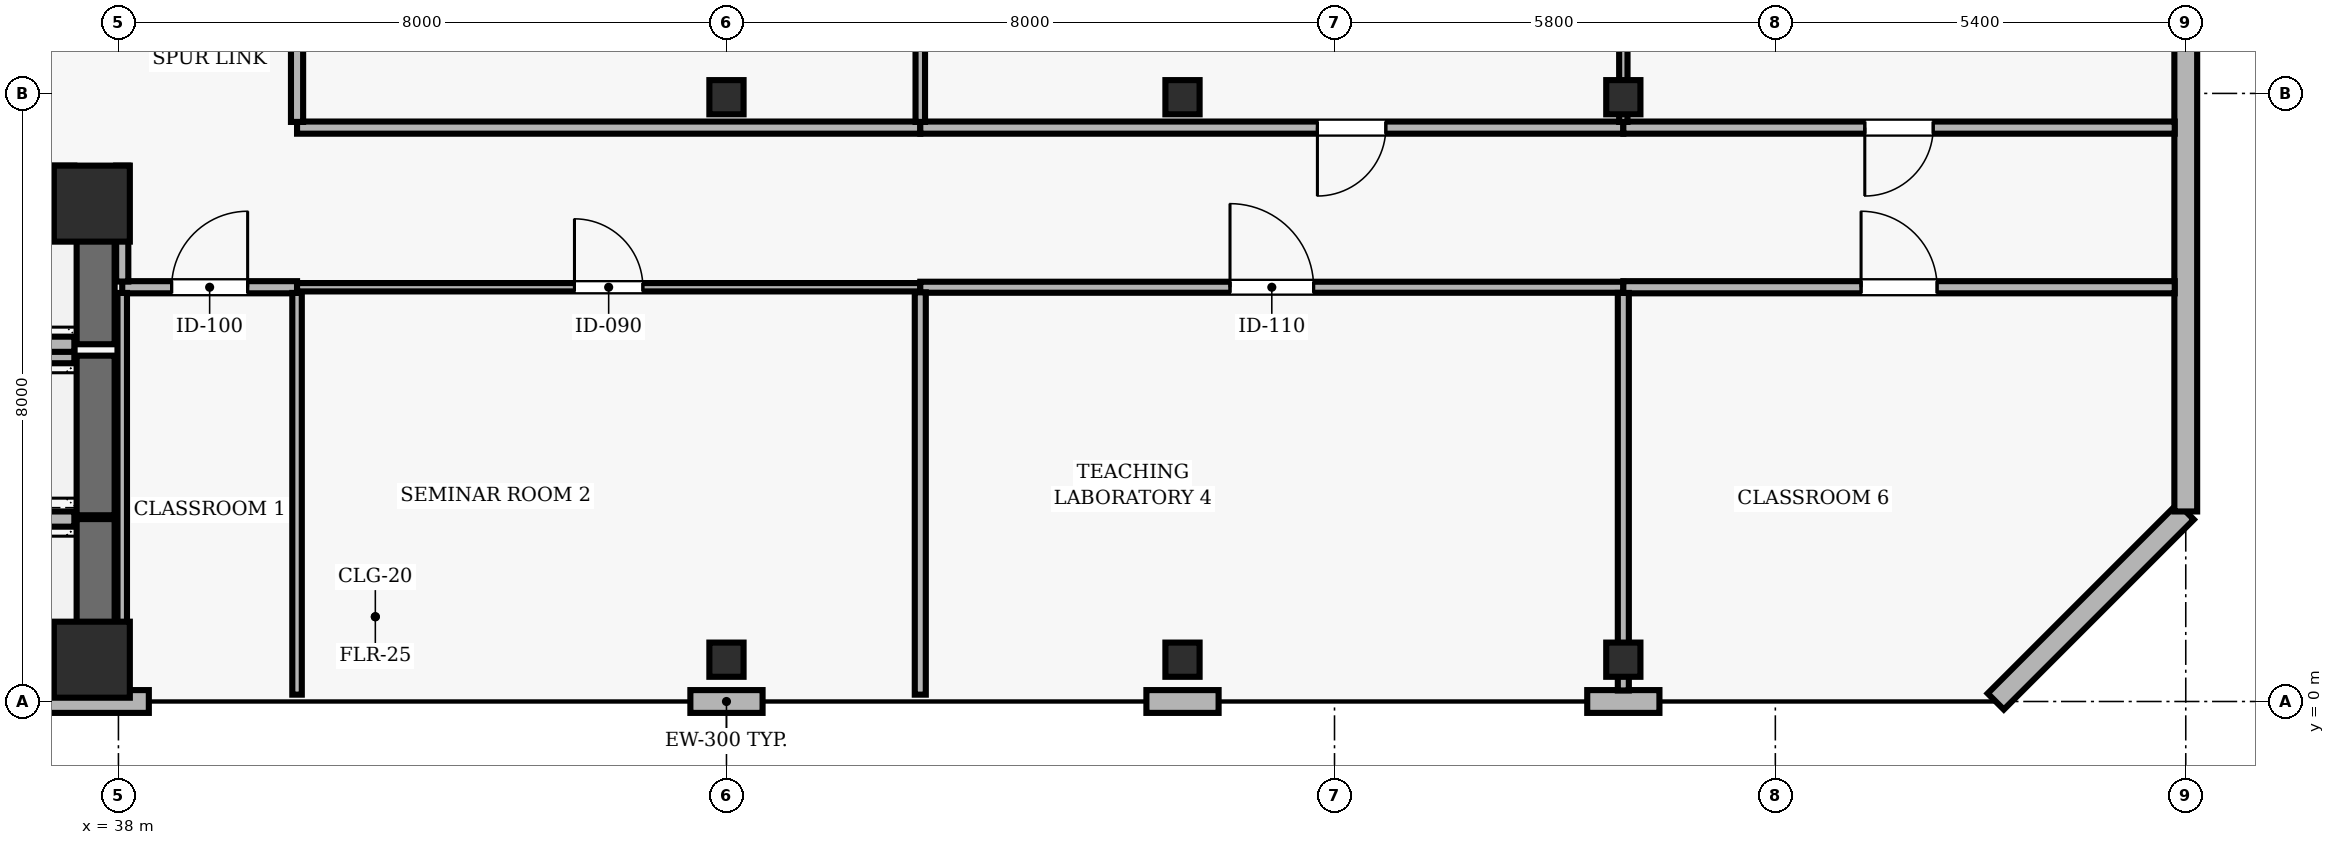
"""IFC4 building model, lengths in metres.
Left out: names, types, materials, properties, quantities, classifications, styles, units other than length and angle.
Written with IfcOpenShell. Run it as: python <this file> out.ifc"""

import sys

from ifc_helpers import new_model, si_unit, direction, frame, frame_2d, origin, origin_2d, place, context, subcontext, project, spatial, rectangle, hollow_rectangle, extrude, element, fill, save


model = new_model("IFC4")
c1 = context("Model", 3, precision=1e-05, world=origin(), true_north=direction((0.0, 1.0)))
c2 = subcontext(c1, "Body", "Model", "MODEL_VIEW")
j1 = project(units=[si_unit("LENGTHUNIT", "METRE"), si_unit("PLANEANGLEUNIT", "RADIAN")], contexts=[c1])
p1 = place(None, origin())
s1 = spatial("IfcSite", under=j1, at=p1, CompositionType="ELEMENT")
p2 = place(p1, origin())
s2 = spatial("IfcBuilding", under=s1, at=p2, CompositionType="ELEMENT")
p3 = place(p2, frame((0.0, 0.0, 183.6)))
s3 = spatial("IfcBuildingStorey", under=s2, at=p3, CompositionType="ELEMENT", Elevation=183.6)
for number, where, z_axis, x_axis in (
    (1, (37.65, 0.55, 0.0), (0.0, 0.0, 1.0), (1.0, 0.0, 0.0)),
    (2, (37.65, 6.55, 0.0), (0.0, 0.0, 1.0), (1.0, 0.0, 0.0)),
):
    element("IfcColumn", number, at=place(p3, frame(where, z_axis=z_axis, x_axis=x_axis)), inside=s3, PredefinedType="COLUMN", context=c2, shape_type="SweptSolid", body=[
        extrude(rectangle(XDim=1.0, YDim=1.0, at=origin_2d()), origin(), (0.0, 0.0, 1.0), 3.9),
    ])
for number, where, z_axis, x_axis in (
    (3, (46.0, 0.55, 0.0), (0.0, 0.0, 1.0), (1.0, 0.0, 0.0)),
    (4, (46.0, 7.95, 0.0), (0.0, 0.0, 1.0), (1.0, 0.0, 0.0)),
    (5, (52.0, 0.55, 0.0), (0.0, 0.0, 1.0), (1.0, 0.0, 0.0)),
    (6, (52.0, 7.95, 0.0), (0.0, 0.0, 1.0), (1.0, 0.0, 0.0)),
    (7, (57.8, 0.55, 0.0), (0.0, 0.0, 1.0), (1.0, 0.0, 0.0)),
    (8, (57.8, 7.95, 0.0), (0.0, 0.0, 1.0), (1.0, 0.0, 0.0)),
):
    element("IfcColumn", number, at=place(p3, frame(where, z_axis=z_axis, x_axis=x_axis)), inside=s3, PredefinedType="COLUMN", context=c2, shape_type="SweptSolid", body=[
        extrude(hollow_rectangle(XDim=0.45, YDim=0.45, WallThickness=0.02, at=origin_2d()), origin(), (0.0, 0.0, 1.0), 3.9),
    ])
p4 = place(p3, frame((31.0, 0.0, 0.0), z_axis=(0.0, 0.0, 1.0), x_axis=(1.0, 0.0, 0.0)))
e9 = element("IfcWall", 9, at=p4, inside=s3, PredefinedType="SOLIDWALL", context=c2, shape_type="SweptSolid", body=[
    extrude(rectangle(XDim=7.4, YDim=0.3, at=frame_2d((3.7, 0.0))), origin(), (0.0, 0.0, 1.0), 3.69),
])
for number, where, z_axis, x_axis in (
    (10, (45.525, 0.0, 0.0), (0.0, 0.0, 1.0), (1.0, 0.0, 0.0)),
    (11, (51.525, 0.0, 0.0), (0.0, 0.0, 1.0), (1.0, 0.0, 0.0)),
):
    element("IfcWall", number, at=place(p3, frame(where, z_axis=z_axis, x_axis=x_axis)), inside=s3, PredefinedType="SOLIDWALL", context=c2, shape_type="SweptSolid", body=[
        extrude(rectangle(XDim=0.95, YDim=0.3, at=frame_2d((0.475, 0.0))), origin(), (0.0, 0.0, 1.0), 3.69),
    ])
p5 = place(p3, frame((57.325, 0.0, 0.0), z_axis=(0.0, 0.0, 1.0), x_axis=(1.0, 0.0, 0.0)))
e12 = element("IfcWall", 12, at=p5, inside=s3, PredefinedType="SOLIDWALL", context=c2, shape_type="SweptSolid", body=[
    extrude(rectangle(XDim=0.95, YDim=0.3, at=frame_2d((0.475, 0.0))), origin(), (0.0, 0.0, 1.0), 3.69),
])
p6 = place(p3, frame((62.7, 0.0, 0.0), z_axis=(0.0, 0.0, 1.0), x_axis=(0.707106781187, 0.707106781187, 0.0)))
e13 = element("IfcWall", 13, at=p6, inside=s3, PredefinedType="SOLIDWALL", context=c2, shape_type="SweptSolid", body=[
    extrude(rectangle(XDim=3.536, YDim=0.3, at=frame_2d((1.768, 0.0))), origin(), (0.0, 0.0, 1.0), 3.69),
])
p7 = place(p3, frame((65.2, 2.5, 0.0), z_axis=(0.0, 0.0, 1.0), x_axis=(0.0, 1.0, 0.0)))
e14 = element("IfcWall", 14, at=p7, inside=s3, PredefinedType="SOLIDWALL", context=c2, shape_type="SweptSolid", body=[
    extrude(rectangle(XDim=11.0, YDim=0.3, at=frame_2d((5.5, 0.0))), origin(), (0.0, 0.0, 1.0), 3.69),
])
p8 = place(p7, frame((7.05, 0.0, 0.9)))
e15 = element("IfcOpeningElement", 15, at=p8, cuts=e14, PredefinedType="OPENING", context=c2, shape_type="SweptSolid", body=[
    extrude(rectangle(XDim=2.4, YDim=2.2, at=frame_2d((1.2, 1.1))), frame((0.0, 0.16, 0.0), z_axis=(0.0, -1.0, 0.0), x_axis=(1.0, 0.0, 0.0)), (0.0, 0.0, 1.0), 0.32),
])
p9 = place(p3, frame((37.7, 0.3, 0.0), z_axis=(0.0, 0.0, 1.0), x_axis=(0.0, 1.0, 0.0)))
e16 = element("IfcWall", 16, at=p9, inside=s3, PredefinedType="SHEAR", context=c2, shape_type="SweptSolid", body=[
    extrude(rectangle(XDim=2.1, YDim=0.5, at=frame_2d((1.05, 0.0))), origin(), (0.0, 0.0, 1.0), 3.69),
])
for number, where, z_axis, x_axis in (
    (17, (35.28, 0.3, 0.0), (0.0, 0.0, 1.0), (1.0, 0.0, 0.0)),
    (18, (37.42, 2.4, 0.0), (0.0, 0.0, 1.0), (-1.0, 0.0, 0.0)),
):
    element("IfcWall", number, at=place(p3, frame(where, z_axis=z_axis, x_axis=x_axis)), inside=s3, PredefinedType="SOLIDWALL", context=c2, shape_type="SweptSolid", body=[
        extrude(rectangle(XDim=2.14, YDim=0.2, at=frame_2d((1.07, 0.0))), origin(), (0.0, 0.0, 1.0), 3.69),
    ])
p10 = place(p3, frame((37.7, 2.45, 0.0), z_axis=(0.0, 0.0, 1.0), x_axis=(0.0, 1.0, 0.0)))
e19 = element("IfcWall", 19, at=p10, inside=s3, PredefinedType="SHEAR", context=c2, shape_type="SweptSolid", body=[
    extrude(rectangle(XDim=2.1, YDim=0.5, at=frame_2d((1.05, 0.0))), origin(), (0.0, 0.0, 1.0), 3.69),
])
p11 = place(p3, frame((37.42, 4.55, 0.0), z_axis=(0.0, 0.0, 1.0), x_axis=(-1.0, 0.0, 0.0)))
e20 = element("IfcWall", 20, at=p11, inside=s3, PredefinedType="SOLIDWALL", context=c2, shape_type="SweptSolid", body=[
    extrude(rectangle(XDim=2.14, YDim=0.2, at=frame_2d((1.07, 0.0))), origin(), (0.0, 0.0, 1.0), 3.69),
])
p12 = place(p3, frame((37.7, 4.7, 0.0), z_axis=(0.0, 0.0, 1.0), x_axis=(0.0, 1.0, 0.0)))
e21 = element("IfcWall", 21, at=p12, inside=s3, PredefinedType="SHEAR", context=c2, shape_type="SweptSolid", body=[
    extrude(rectangle(XDim=2.25, YDim=0.5, at=frame_2d((1.125, 0.0))), origin(), (0.0, 0.0, 1.0), 3.69),
])
for number, where, z_axis, x_axis in (
    (22, (35.28, 4.7, 0.0), (0.0, 0.0, 1.0), (1.0, 0.0, 0.0)),
    (23, (37.42, 6.95, 0.0), (0.0, 0.0, 1.0), (-1.0, 0.0, 0.0)),
):
    element("IfcWall", number, at=place(p3, frame(where, z_axis=z_axis, x_axis=x_axis)), inside=s3, PredefinedType="SOLIDWALL", context=c2, shape_type="SweptSolid", body=[
        extrude(rectangle(XDim=2.14, YDim=0.2, at=frame_2d((1.07, 0.0))), origin(), (0.0, 0.0, 1.0), 3.69),
    ])
p13 = place(p3, frame((38.05, 5.45, 0.0), z_axis=(0.0, 0.0, 1.0), x_axis=(1.0, 0.0, 0.0)))
e24 = element("IfcWall", 24, at=p13, inside=s3, PredefinedType="PARTITIONING", context=c2, shape_type="SweptSolid", body=[
    extrude(rectangle(XDim=2.3, YDim=0.16, at=frame_2d((1.15, 0.0))), origin(), (0.0, 0.0, 1.0), 3.343),
])
p14 = place(p13, frame((0.65, 0.0, 0.0)))
e25 = element("IfcOpeningElement", 25, at=p14, cuts=e24, PredefinedType="OPENING", context=c2, shape_type="SweptSolid", body=[
    extrude(rectangle(XDim=1.0, YDim=2.1, at=frame_2d((0.5, 1.05))), frame((0.0, 0.09, 0.0), z_axis=(0.0, -1.0, 0.0), x_axis=(1.0, 0.0, 0.0)), (0.0, 0.0, 1.0), 0.18),
])
p15 = place(p3, frame((40.35, 5.45, 0.0), z_axis=(0.0, 0.0, 1.0), x_axis=(1.0, 0.0, 0.0)))
e26 = element("IfcWall", 26, at=p15, inside=s3, PredefinedType="MOVABLE", context=c2, shape_type="SweptSolid", body=[
    extrude(rectangle(XDim=8.2, YDim=0.11, at=frame_2d((4.1, 0.0))), origin(), (0.0, 0.0, 1.0), 3.343),
])
p16 = place(p15, frame((3.65, 0.0, 0.0)))
e27 = element("IfcOpeningElement", 27, at=p16, cuts=e26, PredefinedType="OPENING", context=c2, shape_type="SweptSolid", body=[
    extrude(rectangle(XDim=0.9, YDim=2.1, at=frame_2d((0.45, 1.05))), frame((0.0, 0.065, 0.0), z_axis=(0.0, -1.0, 0.0), x_axis=(1.0, 0.0, 0.0)), (0.0, 0.0, 1.0), 0.13),
])
p17 = place(p3, frame((48.55, 5.45, 0.0), z_axis=(0.0, 0.0, 1.0), x_axis=(1.0, 0.0, 0.0)))
e28 = element("IfcWall", 28, at=p17, inside=s3, PredefinedType="PARTITIONING", context=c2, shape_type="SweptSolid", body=[
    extrude(rectangle(XDim=9.25, YDim=0.145, at=frame_2d((4.625, 0.0))), origin(), (0.0, 0.0, 1.0), 3.343),
])
p18 = place(p17, frame((4.075, 0.0, 0.0)))
e29 = element("IfcOpeningElement", 29, at=p18, cuts=e28, PredefinedType="OPENING", context=c2, shape_type="SweptSolid", body=[
    extrude(rectangle(XDim=1.1, YDim=2.15, at=frame_2d((0.55, 1.075))), frame((0.0, 0.083, 0.0), z_axis=(0.0, -1.0, 0.0), x_axis=(1.0, 0.0, 0.0)), (0.0, 0.0, 1.0), 0.165),
])
p19 = place(p3, frame((48.55, 7.55, 0.0), z_axis=(0.0, 0.0, 1.0), x_axis=(-1.0, 0.0, 0.0)))
e30 = element("IfcWall", 30, at=p19, inside=s3, PredefinedType="PARTITIONING", context=c2, shape_type="SweptSolid", body=[
    extrude(rectangle(XDim=8.2, YDim=0.16, at=frame_2d((4.1, 0.0))), origin(), (0.0, 0.0, 1.0), 3.139),
])
p20 = place(p3, frame((57.8, 5.45, 0.0), z_axis=(0.0, 0.0, 1.0), x_axis=(1.0, 0.0, 0.0)))
e31 = element("IfcWall", 31, at=p20, inside=s3, PredefinedType="PARTITIONING", context=c2, shape_type="SweptSolid", body=[
    extrude(rectangle(XDim=7.255, YDim=0.16, at=frame_2d((3.627, 0.0))), origin(), (0.0, 0.0, 1.0), 3.69),
])
p21 = place(p20, frame((3.128, 0.0, 0.0)))
e32 = element("IfcOpeningElement", 32, at=p21, cuts=e31, PredefinedType="OPENING", context=c2, shape_type="SweptSolid", body=[
    extrude(rectangle(XDim=1.0, YDim=2.1, at=frame_2d((0.5, 1.05))), frame((0.0, 0.09, 0.0), z_axis=(0.0, -1.0, 0.0), x_axis=(1.0, 0.0, 0.0)), (0.0, 0.0, 1.0), 0.18),
])
p22 = place(p3, frame((57.8, 7.55, 0.0), z_axis=(0.0, 0.0, 1.0), x_axis=(-1.0, 0.0, 0.0)))
e33 = element("IfcWall", 33, at=p22, inside=s3, PredefinedType="PARTITIONING", context=c2, shape_type="SweptSolid", body=[
    extrude(rectangle(XDim=9.25, YDim=0.16, at=frame_2d((4.625, 0.0))), origin(), (0.0, 0.0, 1.0), 3.139),
])
p23 = place(p22, frame((3.125, 0.0, 0.0)))
e34 = element("IfcOpeningElement", 34, at=p23, cuts=e33, PredefinedType="OPENING", context=c2, shape_type="SweptSolid", body=[
    extrude(rectangle(XDim=0.9, YDim=2.1, at=frame_2d((0.45, 1.05))), frame((0.0, 0.09, 0.0), z_axis=(0.0, -1.0, 0.0), x_axis=(1.0, 0.0, 0.0)), (0.0, 0.0, 1.0), 0.18),
])
p24 = place(p3, frame((65.055, 7.55, 0.0), z_axis=(0.0, 0.0, 1.0), x_axis=(-1.0, 0.0, 0.0)))
e35 = element("IfcWall", 35, at=p24, inside=s3, PredefinedType="PARTITIONING", context=c2, shape_type="SweptSolid", body=[
    extrude(rectangle(XDim=7.255, YDim=0.16, at=frame_2d((3.627, 0.0))), origin(), (0.0, 0.0, 1.0), 3.69),
])
p25 = place(p24, frame((3.178, 0.0, 0.0)))
e36 = element("IfcOpeningElement", 36, at=p25, cuts=e35, PredefinedType="OPENING", context=c2, shape_type="SweptSolid", body=[
    extrude(rectangle(XDim=0.9, YDim=2.1, at=frame_2d((0.45, 1.05))), frame((0.0, 0.09, 0.0), z_axis=(0.0, -1.0, 0.0), x_axis=(1.0, 0.0, 0.0)), (0.0, 0.0, 1.0), 0.18),
])
p26 = place(p3, frame((38.05, 5.375, 0.0), z_axis=(0.0, 0.0, 1.0), x_axis=(0.0, -1.0, 0.0)))
e37 = element("IfcWall", 37, at=p26, inside=s3, PredefinedType="PARTITIONING", context=c2, shape_type="SweptSolid", body=[
    extrude(rectangle(XDim=5.23, YDim=0.125, at=frame_2d((2.615, 0.0))), origin(), (0.0, 0.0, 1.0), 3.139),
])
p27 = place(p3, frame((38.05, 7.05, 0.0), z_axis=(0.0, 0.0, 1.0), x_axis=(0.0, -1.0, 0.0)))
e38 = element("IfcWall", 38, at=p27, inside=s3, PredefinedType="PARTITIONING", context=c2, shape_type="SweptSolid", body=[
    extrude(rectangle(XDim=1.525, YDim=0.16, at=frame_2d((0.763, 0.0))), origin(), (0.0, 0.0, 1.0), 3.139),
])
p28 = place(p3, frame((40.35, 0.09, 0.0), z_axis=(0.0, 0.0, 1.0), x_axis=(0.0, 1.0, 0.0)))
e39 = element("IfcWall", 39, at=p28, inside=s3, PredefinedType="PARTITIONING", context=c2, shape_type="SweptSolid", body=[
    extrude(rectangle(XDim=5.285, YDim=0.125, at=frame_2d((2.643, 0.0))), origin(), (0.0, 0.0, 1.0), 3.69),
])
p29 = place(p3, frame((40.35, 7.625, 0.0), z_axis=(0.0, 0.0, 1.0), x_axis=(0.0, 1.0, 0.0)))
e40 = element("IfcWall", 40, at=p29, inside=s3, PredefinedType="PARTITIONING", context=c2, shape_type="SweptSolid", body=[
    extrude(rectangle(XDim=8.3, YDim=0.16, at=frame_2d((4.15, 0.0))), origin(), (0.0, 0.0, 1.0), 3.343),
])
p30 = place(p29, frame((3.65, 0.0, 0.0)))
e41 = element("IfcOpeningElement", 41, at=p30, cuts=e40, PredefinedType="OPENING", context=c2, shape_type="SweptSolid", body=[
    extrude(rectangle(XDim=1.0, YDim=2.1, at=frame_2d((0.5, 1.05))), frame((0.0, 0.09, 0.0), z_axis=(0.0, -1.0, 0.0), x_axis=(1.0, 0.0, 0.0)), (0.0, 0.0, 1.0), 0.18),
])
p31 = place(p3, frame((48.55, 0.09, 0.0), z_axis=(0.0, 0.0, 1.0), x_axis=(0.0, 1.0, 0.0)))
e42 = element("IfcWall", 42, at=p31, inside=s3, PredefinedType="PARTITIONING", context=c2, shape_type="SweptSolid", body=[
    extrude(rectangle(XDim=5.293, YDim=0.145, at=frame_2d((2.646, 0.0))), origin(), (0.0, 0.0, 1.0), 3.69),
])
p32 = place(p3, frame((48.55, 7.625, 0.0), z_axis=(0.0, 0.0, 1.0), x_axis=(0.0, 1.0, 0.0)))
e43 = element("IfcWall", 43, at=p32, inside=s3, PredefinedType="PARTITIONING", context=c2, shape_type="SweptSolid", body=[
    extrude(rectangle(XDim=8.318, YDim=0.125, at=frame_2d((4.159, 0.0))), origin(), (0.0, 0.0, 1.0), 3.69),
])
p33 = place(p3, frame((57.8, 0.145, 0.0), z_axis=(0.0, 0.0, 1.0), x_axis=(0.0, 1.0, 0.0)))
e44 = element("IfcWall", 44, at=p33, inside=s3, PredefinedType="PARTITIONING", context=c2, shape_type="SweptSolid", body=[
    extrude(rectangle(XDim=5.23, YDim=0.145, at=frame_2d((2.615, 0.0))), origin(), (0.0, 0.0, 1.0), 3.139),
])
p34 = place(p3, frame((57.8, 7.625, 0.0), z_axis=(0.0, 0.0, 1.0), x_axis=(0.0, 1.0, 0.0)))
e45 = element("IfcWall", 45, at=p34, inside=s3, PredefinedType="MOVABLE", context=c2, shape_type="SweptSolid", body=[
    extrude(rectangle(XDim=8.23, YDim=0.11, at=frame_2d((4.115, 0.0))), origin(), (0.0, 0.0, 1.0), 3.139),
])
p35 = place(p14, origin())
e46 = element("IfcDoor", 46, at=p35, inside=s3, OperationType="SINGLE_SWING_RIGHT", PredefinedType="DOOR", context=c2, shape_type="SweptSolid", body=[
    extrude(rectangle(XDim=1.0, YDim=2.1, at=frame_2d((0.5, 1.05))), frame((0.0, 0.025, 0.0), z_axis=(0.0, -1.0, 0.0), x_axis=(1.0, 0.0, 0.0)), (0.0, 0.0, 1.0), 0.05),
])
fill(e25, e46)
p36 = place(p16, origin())
e47 = element("IfcDoor", 47, at=p36, inside=s3, OperationType="SINGLE_SWING_LEFT", PredefinedType="DOOR", context=c2, shape_type="SweptSolid", body=[
    extrude(rectangle(XDim=0.9, YDim=2.1, at=frame_2d((0.45, 1.05))), frame((0.0, 0.025, 0.0), z_axis=(0.0, -1.0, 0.0), x_axis=(1.0, 0.0, 0.0)), (0.0, 0.0, 1.0), 0.05),
])
fill(e27, e47)
p37 = place(p18, origin())
e48 = element("IfcDoor", 48, at=p37, inside=s3, OperationType="SINGLE_SWING_LEFT", PredefinedType="DOOR", context=c2, shape_type="SweptSolid", body=[
    extrude(rectangle(XDim=1.1, YDim=2.15, at=frame_2d((0.55, 1.075))), frame((0.0, 0.025, 0.0), z_axis=(0.0, -1.0, 0.0), x_axis=(1.0, 0.0, 0.0)), (0.0, 0.0, 1.0), 0.05),
])
fill(e29, e48)
p38 = place(p23, origin())
e49 = element("IfcDoor", 49, at=p38, inside=s3, OperationType="SINGLE_SWING_RIGHT", PredefinedType="DOOR", context=c2, shape_type="SweptSolid", body=[
    extrude(rectangle(XDim=0.9, YDim=2.1, at=frame_2d((0.45, 1.05))), frame((0.0, 0.025, 0.0), z_axis=(0.0, -1.0, 0.0), x_axis=(1.0, 0.0, 0.0)), (0.0, 0.0, 1.0), 0.05),
])
fill(e34, e49)
p39 = place(p21, origin())
e50 = element("IfcDoor", 50, at=p39, inside=s3, OperationType="SINGLE_SWING_LEFT", PredefinedType="DOOR", context=c2, shape_type="SweptSolid", body=[
    extrude(rectangle(XDim=1.0, YDim=2.1, at=frame_2d((0.5, 1.05))), frame((0.0, 0.025, 0.0), z_axis=(0.0, -1.0, 0.0), x_axis=(1.0, 0.0, 0.0)), (0.0, 0.0, 1.0), 0.05),
])
fill(e32, e50)
p40 = place(p25, origin())
e51 = element("IfcDoor", 51, at=p40, inside=s3, OperationType="SINGLE_SWING_RIGHT", PredefinedType="DOOR", context=c2, shape_type="SweptSolid", body=[
    extrude(rectangle(XDim=0.9, YDim=2.1, at=frame_2d((0.45, 1.05))), frame((0.0, 0.025, 0.0), z_axis=(0.0, -1.0, 0.0), x_axis=(1.0, 0.0, 0.0)), (0.0, 0.0, 1.0), 0.05),
])
fill(e36, e51)
save(model, sys.argv[1])
